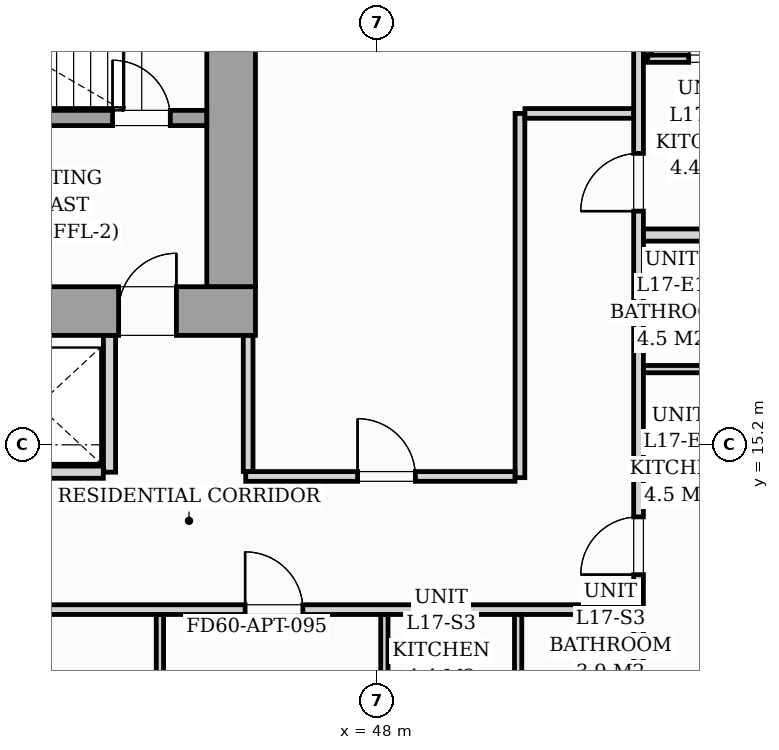
"""IFC4 building model, lengths in metres.
Left out: names, types, materials, properties, quantities, classifications, styles, units other than length and angle.
Written with IfcOpenShell. Run it as: python <this file> out.ifc"""

import sys

from ifc_helpers import new_model, si_unit, direction, frame, frame_2d, origin, origin_2d, place, context, subcontext, project, spatial, rectangle, i_section, extrude, source, transform, mapped, element, fill, save


model = new_model("IFC4")
c1 = context("Model", 3, precision=1e-05, world=origin(), true_north=direction((0.0, 1.0)))
c2 = subcontext(c1, "Body", "Model", "MODEL_VIEW")
j1 = project(units=[si_unit("LENGTHUNIT", "METRE"), si_unit("PLANEANGLEUNIT", "RADIAN")], contexts=[c1])
p1 = place(None, origin())
s1 = spatial("IfcSite", under=j1, at=p1, CompositionType="ELEMENT")
p2 = place(p1, origin())
s2 = spatial("IfcBuilding", under=s1, at=p2, CompositionType="ELEMENT")
p3 = place(p2, frame((0.0, 0.0, 61.4)))
s3 = spatial("IfcBuildingStorey", under=s2, at=p3, CompositionType="ELEMENT", Elevation=61.4)
m1 = source(origin(), c2, "Body", "SweptSolid", [
    extrude(i_section(OverallWidth=0.437, OverallDepth=0.514, WebThickness=0.061, FlangeThickness=0.097, FilletRadius=0.018, at=origin_2d()), origin(), (0.0, 0.0, 1.0), 3.196),
])
p4 = place(p3, frame((45.6, 17.4, 0.002), z_axis=(0.0, 0.0, 1.0), x_axis=(1.0, 0.0, 0.0)))
e1 = element("IfcColumn", 1, at=p4, inside=s3, PredefinedType="PILASTER", context=c2, shape_type="MappedRepresentation", body=[
    mapped(m1, transform((0.0, 0.0, 0.0), scale=1.0)),
])
p5 = place(p3, frame((26.0, 17.4, 0.0), z_axis=(0.0, 0.0, 1.0), x_axis=(1.0, 0.0, 0.0)))
e2 = element("IfcWall", 2, at=p5, inside=s3, PredefinedType="SHEAR", context=c2, shape_type="SweptSolid", body=[
    extrude(rectangle(XDim=20.0, YDim=0.8, at=frame_2d((10.0, 0.0))), origin(), (0.0, 0.0, 1.0), 3.2),
])
p6 = place(p5, frame((1.15, 0.0, 0.0)))
e3 = element("IfcOpeningElement", 3, at=p6, cuts=e2, PredefinedType="OPENING", context=c2, shape_type="SweptSolid", body=[
    extrude(rectangle(XDim=0.95, YDim=2.06, at=frame_2d((0.475, 1.03))), frame((0.0, 0.41, 0.0), z_axis=(0.0, -1.0, 0.0), x_axis=(1.0, 0.0, 0.0)), (0.0, 0.0, 1.0), 0.82),
])
p7 = place(p5, frame((9.58, 0.0, 0.0)))
e4 = element("IfcOpeningElement", 4, at=p7, cuts=e2, PredefinedType="OPENING", context=c2, shape_type="SweptSolid", body=[
    extrude(rectangle(XDim=0.85, YDim=2.0, at=frame_2d((0.425, 1.0))), frame((0.0, 0.41, 0.0), z_axis=(0.0, -1.0, 0.0), x_axis=(1.0, 0.0, 0.0)), (0.0, 0.0, 1.0), 0.82),
])
p8 = place(p5, frame((17.75, 0.0, 0.0)))
e5 = element("IfcOpeningElement", 5, at=p8, cuts=e2, PredefinedType="OPENING", context=c2, shape_type="SweptSolid", body=[
    extrude(rectangle(XDim=0.95, YDim=2.06, at=frame_2d((0.475, 1.03))), frame((0.0, 0.41, 0.0), z_axis=(0.0, -1.0, 0.0), x_axis=(1.0, 0.0, 0.0)), (0.0, 0.0, 1.0), 0.82),
])
p9 = place(p3, frame((45.6, 17.802, 0.0), z_axis=(0.0, 0.0, 1.0), x_axis=(0.0, 1.0, 0.0)))
e6 = element("IfcWall", 6, at=p9, inside=s3, PredefinedType="SHEAR", context=c2, shape_type="SweptSolid", body=[
    extrude(rectangle(XDim=5.796, YDim=0.8, at=frame_2d((2.898, 0.0))), origin(), (0.0, 0.0, 1.0), 3.2),
])
p10 = place(p3, frame((37.05, 20.575, 0.0), z_axis=(0.0, 0.0, 1.0), x_axis=(1.0, 0.0, 0.0)))
e7 = element("IfcWall", 7, at=p10, inside=s3, PredefinedType="SOLIDWALL", context=c2, shape_type="SweptSolid", body=[
    extrude(rectangle(XDim=8.148, YDim=0.25, at=frame_2d((4.074, 0.0))), origin(), (0.0, 0.0, 1.0), 3.2),
])
p11 = place(p10, frame((6.6, 0.0, 0.0)))
e8 = element("IfcOpeningElement", 8, at=p11, cuts=e7, PredefinedType="OPENING", context=c2, shape_type="SweptSolid", body=[
    extrude(rectangle(XDim=0.95, YDim=2.06, at=frame_2d((0.475, 1.03))), frame((0.0, 0.135, 0.0), z_axis=(0.0, -1.0, 0.0), x_axis=(1.0, 0.0, 0.0)), (0.0, 0.0, 1.0), 0.27),
])
p12 = place(p3, frame((43.6, 14.75, 0.0), z_axis=(0.0, 0.0, 1.0), x_axis=(0.0, 1.0, 0.0)))
e9 = element("IfcWall", 9, at=p12, inside=s3, PredefinedType="PARTITIONING", context=c2, shape_type="SweptSolid", body=[
    extrude(rectangle(XDim=2.248, YDim=0.2, at=frame_2d((1.124, 0.0))), origin(), (0.0, 0.0, 1.0), 2.94),
])
p13 = place(p3, frame((41.352, 14.75, 0.0), z_axis=(0.0, 0.0, 1.0), x_axis=(1.0, 0.0, 0.0)))
e10 = element("IfcWall", 10, at=p13, inside=s3, PredefinedType="PARTITIONING", context=c2, shape_type="SweptSolid", body=[
    extrude(rectangle(XDim=2.146, YDim=0.2, at=frame_2d((1.073, 0.0))), origin(), (0.0, 0.0, 1.0), 2.94),
])
p14 = place(p3, frame((15.2, 12.49, 0.0), z_axis=(0.0, 0.0, 1.0), x_axis=(1.0, 0.0, 0.0)))
e11 = element("IfcWall", 11, at=p14, inside=s3, PredefinedType="PARTITIONING", context=c2, shape_type="SweptSolid", body=[
    extrude(rectangle(XDim=37.1, YDim=0.16, at=frame_2d((18.55, 0.0))), origin(), (0.0, 0.0, 1.0), 2.94),
])
p15 = place(p14, frame((5.863, 0.0, 0.0)))
e12 = element("IfcOpeningElement", 12, at=p15, cuts=e11, PredefinedType="OPENING", context=c2, shape_type="SweptSolid", body=[
    extrude(rectangle(XDim=0.95, YDim=2.06, at=frame_2d((0.475, 1.03))), frame((0.0, 0.09, 0.0), z_axis=(0.0, -1.0, 0.0), x_axis=(1.0, 0.0, 0.0)), (0.0, 0.0, 1.0), 0.18),
])
p16 = place(p14, frame((18.25, 0.0, 0.0)))
e13 = element("IfcOpeningElement", 13, at=p16, cuts=e11, PredefinedType="OPENING", context=c2, shape_type="SweptSolid", body=[
    extrude(rectangle(XDim=0.95, YDim=2.06, at=frame_2d((0.475, 1.03))), frame((0.0, 0.09, 0.0), z_axis=(0.0, -1.0, 0.0), x_axis=(1.0, 0.0, 0.0)), (0.0, 0.0, 1.0), 0.18),
])
p17 = place(p14, frame((30.63, 0.0, 0.0)))
e14 = element("IfcOpeningElement", 14, at=p17, cuts=e11, PredefinedType="OPENING", context=c2, shape_type="SweptSolid", body=[
    extrude(rectangle(XDim=0.95, YDim=2.06, at=frame_2d((0.475, 1.03))), frame((0.0, 0.09, 0.0), z_axis=(0.0, -1.0, 0.0), x_axis=(1.0, 0.0, 0.0)), (0.0, 0.0, 1.0), 0.18),
])
p18 = place(p3, frame((52.3, 2.962, 0.0), z_axis=(0.0, 0.0, 1.0), x_axis=(0.0, 1.0, 0.0)))
e15 = element("IfcWall", 15, at=p18, inside=s3, PredefinedType="PARTITIONING", context=c2, shape_type="SweptSolid", body=[
    extrude(rectangle(XDim=9.446, YDim=0.16, at=frame_2d((4.723, 0.0))), origin(), (0.0, 0.0, 1.0), 2.94),
])
p19 = place(p3, frame((52.3, 12.572, 0.0), z_axis=(0.0, 0.0, 1.0), x_axis=(0.0, 1.0, 0.0)))
e16 = element("IfcWall", 16, at=p19, inside=s3, PredefinedType="PARTITIONING", context=c2, shape_type="SweptSolid", body=[
    extrude(rectangle(XDim=14.866, YDim=0.16, at=frame_2d((7.433, 0.0))), origin(), (0.0, 0.0, 1.0), 2.94),
])
p20 = place(p19, frame((0.493, 0.0, 0.0)))
e17 = element("IfcOpeningElement", 17, at=p20, cuts=e16, PredefinedType="OPENING", context=c2, shape_type="SweptSolid", body=[
    extrude(rectangle(XDim=0.95, YDim=2.06, at=frame_2d((0.475, 1.03))), frame((0.0, 0.09, 0.0), z_axis=(0.0, -1.0, 0.0), x_axis=(1.0, 0.0, 0.0)), (0.0, 0.0, 1.0), 0.18),
])
p21 = place(p19, frame((6.471, 0.0, 0.0)))
e18 = element("IfcOpeningElement", 18, at=p21, cuts=e16, PredefinedType="OPENING", context=c2, shape_type="SweptSolid", body=[
    extrude(rectangle(XDim=0.95, YDim=2.06, at=frame_2d((0.475, 1.03))), frame((0.0, 0.09, 0.0), z_axis=(0.0, -1.0, 0.0), x_axis=(1.0, 0.0, 0.0)), (0.0, 0.0, 1.0), 0.18),
])
for number, where, z_axis, x_axis in (
    (19, (48.12, 10.302, 0.0), (0.0, 0.0, 1.0), (0.0, 1.0, 0.0)),
    (20, (50.32, 10.302, 0.0), (0.0, 0.0, 1.0), (0.0, 1.0, 0.0)),
):
    element("IfcWall", number, at=place(p3, frame(where, z_axis=z_axis, x_axis=x_axis)), inside=s3, PredefinedType="PARTITIONING", context=c2, shape_type="SweptSolid", body=[
        extrude(rectangle(XDim=2.106, YDim=0.12, at=frame_2d((1.053, 0.0))), origin(), (0.0, 0.0, 1.0), 2.94),
    ])
p22 = place(p3, frame((44.429, 2.962, 0.0), z_axis=(0.0, 0.0, 1.0), x_axis=(0.0, 1.0, 0.0)))
e21 = element("IfcWall", 21, at=p22, inside=s3, PredefinedType="PARTITIONING", context=c2, shape_type="SweptSolid", body=[
    extrude(rectangle(XDim=9.446, YDim=0.12, at=frame_2d((4.723, 0.0))), origin(), (0.0, 0.0, 1.0), 2.136),
])
p23 = place(p22, frame((4.288, 0.0, 0.0)))
e22 = element("IfcOpeningElement", 22, at=p23, cuts=e21, PredefinedType="OPENING", context=c2, shape_type="SweptSolid", body=[
    extrude(rectangle(XDim=0.85, YDim=2.01, at=frame_2d((0.425, 1.005))), frame((0.0, 0.07, 0.0), z_axis=(0.0, -1.0, 0.0), x_axis=(1.0, 0.0, 0.0)), (0.0, 0.0, 1.0), 0.14),
])
p24 = place(p3, frame((52.382, 18.65, 0.0), z_axis=(0.0, 0.0, 1.0), x_axis=(1.0, 0.0, 0.0)))
e23 = element("IfcWall", 23, at=p24, inside=s3, PredefinedType="PARTITIONING", context=c2, shape_type="SweptSolid", body=[
    extrude(rectangle(XDim=7.338, YDim=0.2, at=frame_2d((3.669, 0.0))), origin(), (0.0, 0.0, 1.0), 2.94),
])
p25 = place(p3, frame((52.382, 16.445, 0.0), z_axis=(0.0, 0.0, 1.0), x_axis=(1.0, 0.0, 0.0)))
e24 = element("IfcWall", 24, at=p25, inside=s3, PredefinedType="PARTITIONING", context=c2, shape_type="SweptSolid", body=[
    extrude(rectangle(XDim=2.256, YDim=0.12, at=frame_2d((1.128, 0.0))), origin(), (0.0, 0.0, 1.0), 2.045),
])
p26 = place(p3, frame((52.382, 14.34, 0.0), z_axis=(0.0, 0.0, 1.0), x_axis=(1.0, 0.0, 0.0)))
e25 = element("IfcWall", 25, at=p26, inside=s3, PredefinedType="PARTITIONING", context=c2, shape_type="SweptSolid", body=[
    extrude(rectangle(XDim=2.256, YDim=0.12, at=frame_2d((1.128, 0.0))), origin(), (0.0, 0.0, 1.0), 2.94),
])
p27 = place(p3, frame((52.45, 21.55, 0.0), z_axis=(0.0, 0.0, 1.0), x_axis=(1.0, 0.0, 0.0)))
e26 = element("IfcWall", 26, at=p27, inside=s3, PredefinedType="PARTITIONING", context=c2, shape_type="SweptSolid", body=[
    extrude(rectangle(XDim=4.2, YDim=0.12, at=frame_2d((2.1, 0.0))), origin(), (0.0, 0.0, 1.0), 2.94),
])
p28 = place(p27, frame((0.675, 0.0, 0.0)))
e27 = element("IfcOpeningElement", 27, at=p28, cuts=e26, PredefinedType="OPENING", context=c2, shape_type="SweptSolid", body=[
    extrude(rectangle(XDim=0.85, YDim=2.05, at=frame_2d((0.425, 1.025))), frame((0.0, 0.07, 0.0), z_axis=(0.0, -1.0, 0.0), x_axis=(1.0, 0.0, 0.0)), (0.0, 0.0, 1.0), 0.14),
])
p29 = place(p27, frame((2.8, 0.0, 0.0)))
e28 = element("IfcOpeningElement", 28, at=p29, cuts=e26, PredefinedType="OPENING", context=c2, shape_type="SweptSolid", body=[
    extrude(rectangle(XDim=0.8, YDim=2.02, at=frame_2d((0.4, 1.01))), frame((0.0, 0.07, 0.0), z_axis=(0.0, -1.0, 0.0), x_axis=(1.0, 0.0, 0.0)), (0.0, 0.0, 1.0), 0.14),
])
p30 = place(p3, frame((52.45, 21.612, 0.0), z_axis=(0.0, 0.0, 1.0), x_axis=(0.0, 1.0, 0.0)))
e29 = element("IfcWall", 29, at=p30, inside=s3, PredefinedType="PARTITIONING", context=c2, shape_type="SweptSolid", body=[
    extrude(rectangle(XDim=2.126, YDim=0.12, at=frame_2d((1.063, 0.0))), origin(), (0.0, 0.0, 1.0), 2.94),
])
p31 = place(p3, frame((50.35, 14.66, 0.0), z_axis=(0.0, 0.0, 1.0), x_axis=(0.0, 1.0, 0.0)))
e30 = element("IfcWall", 30, at=p31, inside=s3, PredefinedType="PARTITIONING", context=c2, shape_type="SweptSolid", body=[
    extrude(rectangle(XDim=5.99, YDim=0.16, at=frame_2d((2.995, 0.0))), origin(), (0.0, 0.0, 1.0), 2.94),
])
p32 = place(p3, frame((50.432, 20.65, 0.0), z_axis=(0.0, 0.0, 1.0), x_axis=(1.0, 0.0, 0.0)))
e31 = element("IfcWall", 31, at=p32, inside=s3, PredefinedType="PARTITIONING", context=c2, shape_type="SweptSolid", body=[
    extrude(rectangle(XDim=1.786, YDim=0.16, at=frame_2d((0.893, 0.0))), origin(), (0.0, 0.0, 1.0), 2.94),
])
p33 = place(p3, frame((45.84, 14.68, 0.0), z_axis=(0.0, 0.0, 1.0), x_axis=(1.0, 0.0, 0.0)))
e32 = element("IfcWall", 32, at=p33, inside=s3, PredefinedType="PARTITIONING", context=c2, shape_type="SweptSolid", body=[
    extrude(rectangle(XDim=4.428, YDim=0.16, at=frame_2d((2.214, 0.0))), origin(), (0.0, 0.0, 1.0), 2.94),
])
p34 = place(p33, frame((1.84, 0.0, 0.0)))
e33 = element("IfcOpeningElement", 33, at=p34, cuts=e32, PredefinedType="OPENING", context=c2, shape_type="SweptSolid", body=[
    extrude(rectangle(XDim=0.95, YDim=2.06, at=frame_2d((0.475, 1.03))), frame((0.0, 0.09, 0.0), z_axis=(0.0, -1.0, 0.0), x_axis=(1.0, 0.0, 0.0)), (0.0, 0.0, 1.0), 0.18),
])
p35 = place(p3, frame((45.88, 14.762, 0.0), z_axis=(0.0, 0.0, 1.0), x_axis=(0.0, 1.0, 0.0)))
e34 = element("IfcWall", 34, at=p35, inside=s3, PredefinedType="PARTITIONING", context=c2, shape_type="SweptSolid", body=[
    extrude(rectangle(XDim=2.236, YDim=0.16, at=frame_2d((1.118, 0.0))), origin(), (0.0, 0.0, 1.0), 2.94),
])
m2 = source(origin(), c2, "Body", "SweptSolid", [
    extrude(rectangle(XDim=0.95, YDim=2.06, at=frame_2d((0.475, 1.03))), frame((0.0, 0.025, 0.0), z_axis=(0.0, -1.0, 0.0), x_axis=(1.0, 0.0, 0.0)), (0.0, 0.0, 1.0), 0.05),
])
p36 = place(p8, origin())
e35 = element("IfcDoor", 35, at=p36, inside=s3, OperationType="SINGLE_SWING_RIGHT", PredefinedType="DOOR", context=c2, shape_type="MappedRepresentation", body=[
    mapped(m2, transform((0.0, 0.0, 0.0), scale=1.0)),
])
fill(e5, e35)
p37 = place(p11, origin())
e36 = element("IfcDoor", 36, at=p37, inside=s3, OperationType="SINGLE_SWING_LEFT", PredefinedType="DOOR", context=c2, shape_type="MappedRepresentation", body=[
    mapped(m2, transform((0.0, 0.0, 0.0), scale=1.0)),
])
fill(e8, e36)
m3 = source(origin(), c2, "Body", "SweptSolid", [
    extrude(rectangle(XDim=0.95, YDim=2.06, at=frame_2d((0.475, 1.03))), frame((0.0, 0.025, 0.0), z_axis=(0.0, -1.0, 0.0), x_axis=(1.0, 0.0, 0.0)), (0.0, 0.0, 1.0), 0.05),
])
p38 = place(p17, origin())
e37 = element("IfcDoor", 37, at=p38, inside=s3, OperationType="SINGLE_SWING_LEFT", PredefinedType="DOOR", context=c2, shape_type="MappedRepresentation", body=[
    mapped(m3, transform((0.0, 0.0, 0.0), scale=1.0)),
])
fill(e14, e37)
p39 = place(p20, origin())
e38 = element("IfcDoor", 38, at=p39, inside=s3, OperationType="SINGLE_SWING_LEFT", PredefinedType="DOOR", context=c2, shape_type="MappedRepresentation", body=[
    mapped(m3, transform((0.0, 0.0, 0.0), scale=1.0)),
])
fill(e17, e38)
p40 = place(p21, origin())
e39 = element("IfcDoor", 39, at=p40, inside=s3, OperationType="SINGLE_SWING_LEFT", PredefinedType="DOOR", context=c2, shape_type="MappedRepresentation", body=[
    mapped(m3, transform((0.0, 0.0, 0.0), scale=1.0)),
])
fill(e18, e39)
m4 = source(origin(), c2, "Body", "SweptSolid", [
    extrude(rectangle(XDim=0.85, YDim=2.05, at=frame_2d((0.425, 1.025))), frame((0.0, 0.025, 0.0), z_axis=(0.0, -1.0, 0.0), x_axis=(1.0, 0.0, 0.0)), (0.0, 0.0, 1.0), 0.05),
])
p41 = place(p28, origin())
e40 = element("IfcDoor", 40, at=p41, inside=s3, OperationType="SINGLE_SWING_RIGHT", PredefinedType="DOOR", context=c2, shape_type="MappedRepresentation", body=[
    mapped(m4, transform((0.0, 0.0, 0.0), scale=1.0)),
])
fill(e27, e40)
p42 = place(p34, origin())
e41 = element("IfcDoor", 41, at=p42, inside=s3, OperationType="SINGLE_SWING_LEFT", PredefinedType="DOOR", context=c2, shape_type="MappedRepresentation", body=[
    mapped(m3, transform((0.0, 0.0, 0.0), scale=1.0)),
])
fill(e33, e41)
save(model, sys.argv[1])
